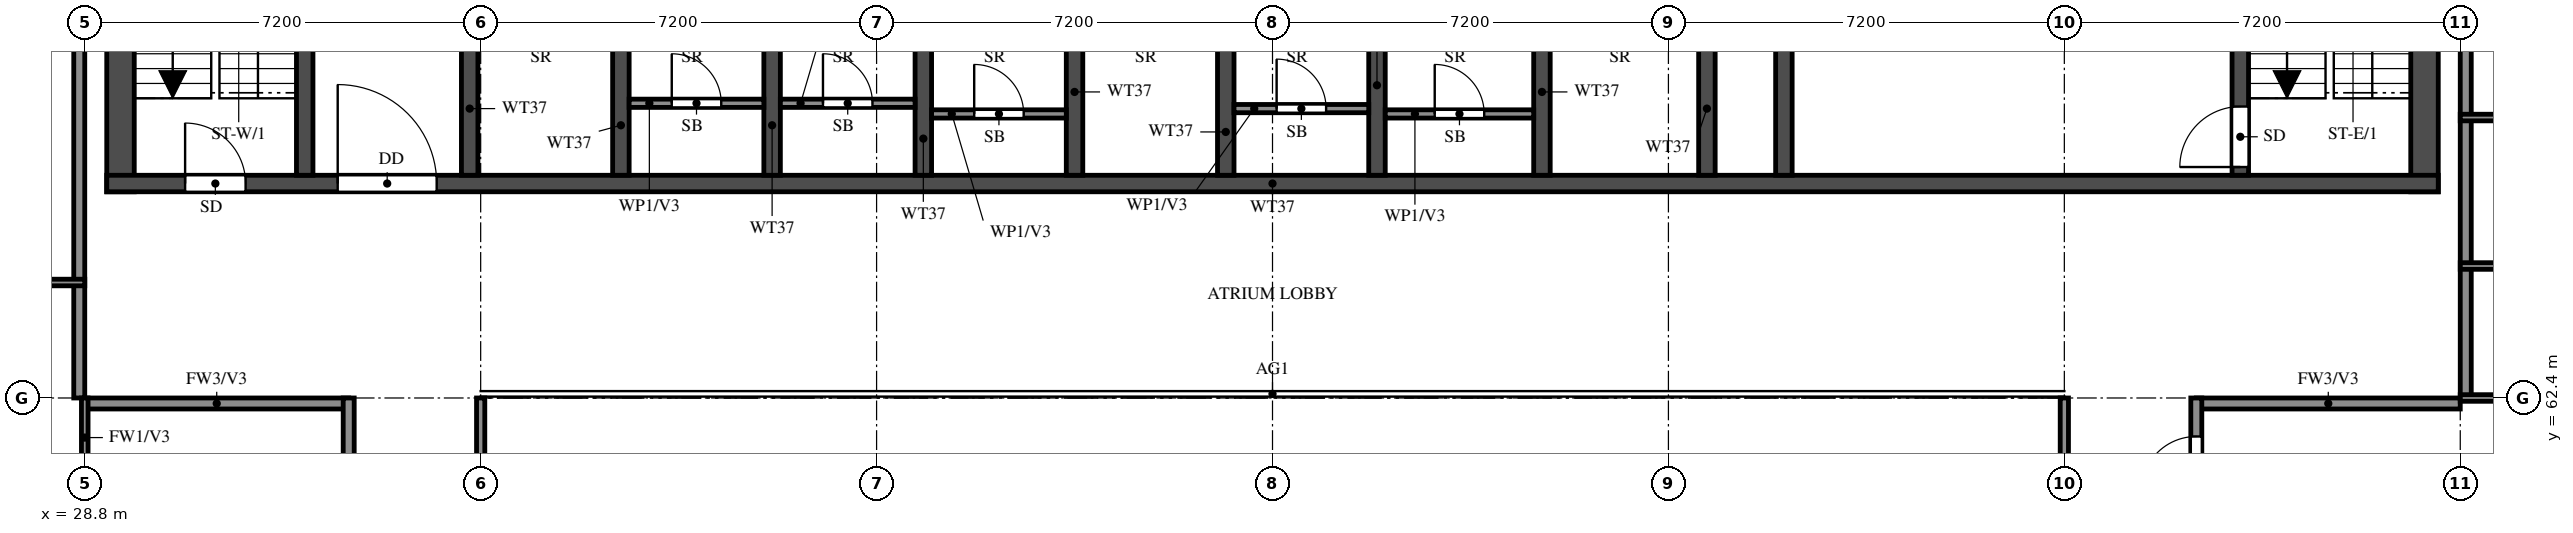
"""IFC4 building model, lengths in metres.
Left out: names, types, materials, properties, quantities, classifications, styles, units other than length and angle.
Written with IfcOpenShell. Run it as: python <this file> out.ifc"""

import sys

from ifc_helpers import new_model, si_unit, direction, frame, frame_2d, origin, place, context, subcontext, project, spatial, rectangle, extrude, element, fill, save


model = new_model("IFC4")
c1 = context("Model", 3, precision=1e-05, world=origin(), true_north=direction((0.0, 1.0)))
c2 = subcontext(c1, "Body", "Model", "MODEL_VIEW")
j1 = project(units=[si_unit("LENGTHUNIT", "METRE"), si_unit("PLANEANGLEUNIT", "RADIAN")], contexts=[c1])
p1 = place(None, origin())
s1 = spatial("IfcSite", under=j1, at=p1, CompositionType="ELEMENT")
p2 = place(p1, origin())
s2 = spatial("IfcBuilding", under=s1, at=p2, CompositionType="ELEMENT")
p3 = place(p2, frame((0.0, 0.0, 257.0)))
s3 = spatial("IfcBuildingStorey", under=s2, at=p3, CompositionType="ELEMENT", Elevation=257.0)
for number, where, z_axis, x_axis in (
    (1, (29.45, 66.15, 0.0), (0.0, 0.0, 1.0), (0.0, 1.0, 0.0)),
    (2, (71.35, 66.15, 0.0), (0.0, 0.0, 1.0), (0.0, 1.0, 0.0)),
):
    element("IfcWall", number, at=place(p3, frame(where, z_axis=z_axis, x_axis=x_axis)), inside=s3, PredefinedType="SHEAR", context=c2, shape_type="SweptSolid", body=[
        extrude(rectangle(XDim=11.85, YDim=0.5, at=frame_2d((5.925, 0.0))), origin(), (0.0, 0.0, 1.0), 3.22),
    ])
p4 = place(p3, frame((29.2, 66.3, 0.0), z_axis=(0.0, 0.0, 1.0), x_axis=(1.0, 0.0, 0.0)))
e3 = element("IfcWall", 3, at=p4, inside=s3, PredefinedType="SHEAR", context=c2, shape_type="SweptSolid", body=[
    extrude(rectangle(XDim=42.4, YDim=0.3, at=frame_2d((21.2, 0.0))), origin(), (0.0, 0.0, 1.0), 3.22),
])
p5 = place(p4, frame((1.425, 0.0, 0.0)))
e4 = element("IfcOpeningElement", 4, at=p5, cuts=e3, PredefinedType="OPENING", context=c2, shape_type="SweptSolid", body=[
    extrude(rectangle(XDim=1.1, YDim=2.1, at=frame_2d((0.55, 1.05))), frame((0.0, 0.16, 0.0), z_axis=(0.0, -1.0, 0.0), x_axis=(1.0, 0.0, 0.0)), (0.0, 0.0, 1.0), 0.32),
])
p6 = place(p4, frame((4.2, 0.0, 0.0)))
e5 = element("IfcOpeningElement", 5, at=p6, cuts=e3, PredefinedType="OPENING", context=c2, shape_type="SweptSolid", body=[
    extrude(rectangle(XDim=1.8, YDim=2.1, at=frame_2d((0.9, 1.05))), frame((0.0, 0.16, 0.0), z_axis=(0.0, -1.0, 0.0), x_axis=(1.0, 0.0, 0.0)), (0.0, 0.0, 1.0), 0.32),
])
p7 = place(p3, frame((32.8, 66.45, 0.0), z_axis=(0.0, 0.0, 1.0), x_axis=(0.0, 1.0, 0.0)))
e6 = element("IfcWall", 6, at=p7, inside=s3, PredefinedType="SHEAR", context=c2, shape_type="SweptSolid", body=[
    extrude(rectangle(XDim=11.05, YDim=0.3, at=frame_2d((5.525, 0.0))), origin(), (0.0, 0.0, 1.0), 3.22),
])
p8 = place(p3, frame((68.0, 66.45, 0.0), z_axis=(0.0, 0.0, 1.0), x_axis=(0.0, 1.0, 0.0)))
e7 = element("IfcWall", 7, at=p8, inside=s3, PredefinedType="SHEAR", context=c2, shape_type="SweptSolid", body=[
    extrude(rectangle(XDim=11.05, YDim=0.3, at=frame_2d((5.525, 0.0))), origin(), (0.0, 0.0, 1.0), 3.22),
])
p9 = place(p8, frame((0.15, 0.0, 0.0)))
e8 = element("IfcOpeningElement", 8, at=p9, cuts=e7, PredefinedType="OPENING", context=c2, shape_type="SweptSolid", body=[
    extrude(rectangle(XDim=1.1, YDim=2.1, at=frame_2d((0.55, 1.05))), frame((0.0, 0.16, 0.0), z_axis=(0.0, -1.0, 0.0), x_axis=(1.0, 0.0, 0.0)), (0.0, 0.0, 1.0), 0.32),
])
p10 = place(p3, frame((59.7, 66.45, 0.0), z_axis=(0.0, 0.0, 1.0), x_axis=(0.0, 1.0, 0.0)))
e9 = element("IfcWall", 9, at=p10, inside=s3, PredefinedType="SHEAR", context=c2, shape_type="SweptSolid", body=[
    extrude(rectangle(XDim=6.175, YDim=0.3, at=frame_2d((3.087, 0.0))), origin(), (0.0, 0.0, 1.0), 3.22),
])
p11 = place(p10, frame((3.85, 0.0, 0.0)))
e10 = element("IfcOpeningElement", 10, at=p11, cuts=e9, PredefinedType="OPENING", context=c2, shape_type="SweptSolid", body=[
    extrude(rectangle(XDim=1.2, YDim=2.1, at=frame_2d((0.6, 1.05))), frame((0.0, 0.16, 0.0), z_axis=(0.0, -1.0, 0.0), x_axis=(1.0, 0.0, 0.0)), (0.0, 0.0, 1.0), 0.32),
])
for number, where, z_axis, x_axis in (
    (11, (35.8, 66.45, 0.0), (0.0, 0.0, 1.0), (0.0, 1.0, 0.0)),
    (12, (38.55, 66.45, 0.0), (0.0, 0.0, 1.0), (0.0, 1.0, 0.0)),
    (13, (41.3, 66.45, 0.0), (0.0, 0.0, 1.0), (0.0, 1.0, 0.0)),
    (14, (44.05, 66.45, 0.0), (0.0, 0.0, 1.0), (0.0, 1.0, 0.0)),
    (15, (46.8, 66.45, 0.0), (0.0, 0.0, 1.0), (0.0, 1.0, 0.0)),
    (16, (49.55, 66.45, 0.0), (0.0, 0.0, 1.0), (0.0, 1.0, 0.0)),
    (17, (52.3, 66.45, 0.0), (0.0, 0.0, 1.0), (0.0, 1.0, 0.0)),
    (18, (55.3, 66.45, 0.0), (0.0, 0.0, 1.0), (0.0, 1.0, 0.0)),
    (19, (58.3, 66.45, 0.0), (0.0, 0.0, 1.0), (0.0, 1.0, 0.0)),
):
    element("IfcWall", number, at=place(p3, frame(where, z_axis=z_axis, x_axis=x_axis)), inside=s3, PredefinedType="SHEAR", context=c2, shape_type="SweptSolid", body=[
        extrude(rectangle(XDim=2.425, YDim=0.3, at=frame_2d((1.212, 0.0))), origin(), (0.0, 0.0, 1.0), 3.22),
    ])
p12 = place(p3, frame((38.7, 67.76, 0.0), z_axis=(0.0, 0.0, 1.0), x_axis=(1.0, 0.0, 0.0)))
e20 = element("IfcWall", 20, at=p12, inside=s3, PredefinedType="PARTITIONING", context=c2, shape_type="SweptSolid", body=[
    extrude(rectangle(XDim=2.45, YDim=0.15, at=frame_2d((1.225, 0.0))), origin(), (0.0, 0.0, 1.0), 3.22),
])
p13 = place(p12, frame((0.775, 0.0, 0.0)))
e21 = element("IfcOpeningElement", 21, at=p13, cuts=e20, PredefinedType="OPENING", context=c2, shape_type="SweptSolid", body=[
    extrude(rectangle(XDim=0.9, YDim=2.1, at=frame_2d((0.45, 1.05))), frame((0.0, 0.085, 0.0), z_axis=(0.0, -1.0, 0.0), x_axis=(1.0, 0.0, 0.0)), (0.0, 0.0, 1.0), 0.17),
])
p14 = place(p3, frame((41.45, 67.76, 0.0), z_axis=(0.0, 0.0, 1.0), x_axis=(1.0, 0.0, 0.0)))
e22 = element("IfcWall", 22, at=p14, inside=s3, PredefinedType="PARTITIONING", context=c2, shape_type="SweptSolid", body=[
    extrude(rectangle(XDim=2.45, YDim=0.15, at=frame_2d((1.225, 0.0))), origin(), (0.0, 0.0, 1.0), 3.22),
])
p15 = place(p14, frame((0.775, 0.0, 0.0)))
e23 = element("IfcOpeningElement", 23, at=p15, cuts=e22, PredefinedType="OPENING", context=c2, shape_type="SweptSolid", body=[
    extrude(rectangle(XDim=0.9, YDim=2.1, at=frame_2d((0.45, 1.05))), frame((0.0, 0.085, 0.0), z_axis=(0.0, -1.0, 0.0), x_axis=(1.0, 0.0, 0.0)), (0.0, 0.0, 1.0), 0.17),
])
p16 = place(p3, frame((44.2, 67.565, 0.0), z_axis=(0.0, 0.0, 1.0), x_axis=(1.0, 0.0, 0.0)))
e24 = element("IfcWall", 24, at=p16, inside=s3, PredefinedType="PARTITIONING", context=c2, shape_type="SweptSolid", body=[
    extrude(rectangle(XDim=2.45, YDim=0.15, at=frame_2d((1.225, 0.0))), origin(), (0.0, 0.0, 1.0), 3.22),
])
p17 = place(p16, frame((0.775, 0.0, 0.0)))
e25 = element("IfcOpeningElement", 25, at=p17, cuts=e24, PredefinedType="OPENING", context=c2, shape_type="SweptSolid", body=[
    extrude(rectangle(XDim=0.9, YDim=2.1, at=frame_2d((0.45, 1.05))), frame((0.0, 0.085, 0.0), z_axis=(0.0, -1.0, 0.0), x_axis=(1.0, 0.0, 0.0)), (0.0, 0.0, 1.0), 0.17),
])
p18 = place(p3, frame((49.7, 67.663, 0.0), z_axis=(0.0, 0.0, 1.0), x_axis=(1.0, 0.0, 0.0)))
e26 = element("IfcWall", 26, at=p18, inside=s3, PredefinedType="PARTITIONING", context=c2, shape_type="SweptSolid", body=[
    extrude(rectangle(XDim=2.45, YDim=0.15, at=frame_2d((1.225, 0.0))), origin(), (0.0, 0.0, 1.0), 3.22),
])
p19 = place(p18, frame((0.775, 0.0, 0.0)))
e27 = element("IfcOpeningElement", 27, at=p19, cuts=e26, PredefinedType="OPENING", context=c2, shape_type="SweptSolid", body=[
    extrude(rectangle(XDim=0.9, YDim=2.1, at=frame_2d((0.45, 1.05))), frame((0.0, 0.085, 0.0), z_axis=(0.0, -1.0, 0.0), x_axis=(1.0, 0.0, 0.0)), (0.0, 0.0, 1.0), 0.17),
])
p20 = place(p3, frame((52.45, 67.565, 0.0), z_axis=(0.0, 0.0, 1.0), x_axis=(1.0, 0.0, 0.0)))
e28 = element("IfcWall", 28, at=p20, inside=s3, PredefinedType="PARTITIONING", context=c2, shape_type="SweptSolid", body=[
    extrude(rectangle(XDim=2.7, YDim=0.15, at=frame_2d((1.35, 0.0))), origin(), (0.0, 0.0, 1.0), 3.22),
])
p21 = place(p20, frame((0.9, 0.0, 0.0)))
e29 = element("IfcOpeningElement", 29, at=p21, cuts=e28, PredefinedType="OPENING", context=c2, shape_type="SweptSolid", body=[
    extrude(rectangle(XDim=0.9, YDim=2.1, at=frame_2d((0.45, 1.05))), frame((0.0, 0.085, 0.0), z_axis=(0.0, -1.0, 0.0), x_axis=(1.0, 0.0, 0.0)), (0.0, 0.0, 1.0), 0.17),
])
for number, where, z_axis, x_axis in (
    (30, (28.8, 62.3, 0.0), (0.0, 0.0, 1.0), (1.0, 0.0, 0.0)),
    (31, (67.2, 62.3, 0.0), (0.0, 0.0, 1.0), (1.0, 0.0, 0.0)),
):
    element("IfcWall", number, at=place(p3, frame(where, z_axis=z_axis, x_axis=x_axis)), inside=s3, PredefinedType="SOLIDWALL", context=c2, shape_type="SweptSolid", body=[
        extrude(rectangle(XDim=4.8, YDim=0.2, at=frame_2d((2.4, 0.0))), origin(), (0.0, 0.0, 1.0), 3.22),
    ])
p22 = place(p3, frame((28.7, 62.4, 0.0), z_axis=(0.0, 0.0, 1.0), x_axis=(0.0, 1.0, 0.0)))
e32 = element("IfcWall", 32, at=p22, inside=s3, PredefinedType="SOLIDWALL", context=c2, shape_type="SweptSolid", body=[
    extrude(rectangle(XDim=15.6, YDim=0.2, at=frame_2d((7.8, 0.0))), origin(), (0.0, 0.0, 1.0), 3.22),
])
p23 = place(p3, frame((33.6, 56.4, 0.0), z_axis=(0.0, 0.0, 1.0), x_axis=(0.0, 1.0, 0.0)))
e33 = element("IfcWall", 33, at=p23, inside=s3, PredefinedType="SOLIDWALL", context=c2, shape_type="SweptSolid", body=[
    extrude(rectangle(XDim=6.0, YDim=0.2, at=frame_2d((3.0, 0.0))), origin(), (0.0, 0.0, 1.0), 3.22),
])
p24 = place(p23, frame((3.7, 0.0, 0.0)))
e34 = element("IfcOpeningElement", 34, at=p24, cuts=e33, PredefinedType="OPENING", context=c2, shape_type="SweptSolid", body=[
    extrude(rectangle(XDim=1.0, YDim=2.1, at=frame_2d((0.5, 1.05))), frame((0.0, 0.11, 0.0), z_axis=(0.0, -1.0, 0.0), x_axis=(1.0, 0.0, 0.0)), (0.0, 0.0, 1.0), 0.22),
])
p25 = place(p3, frame((67.2, 60.0, 0.0), z_axis=(0.0, 0.0, 1.0), x_axis=(0.0, 1.0, 0.0)))
e35 = element("IfcWall", 35, at=p25, inside=s3, PredefinedType="SOLIDWALL", context=c2, shape_type="SweptSolid", body=[
    extrude(rectangle(XDim=2.4, YDim=0.2, at=frame_2d((1.2, 0.0))), origin(), (0.0, 0.0, 1.0), 3.22),
])
p26 = place(p25, frame((0.7, 0.0, 0.0)))
e36 = element("IfcOpeningElement", 36, at=p26, cuts=e35, PredefinedType="OPENING", context=c2, shape_type="SweptSolid", body=[
    extrude(rectangle(XDim=1.0, YDim=2.1, at=frame_2d((0.5, 1.05))), frame((0.0, 0.11, 0.0), z_axis=(0.0, -1.0, 0.0), x_axis=(1.0, 0.0, 0.0)), (0.0, 0.0, 1.0), 0.22),
])
p27 = place(p3, frame((72.1, 62.4, 0.0), z_axis=(0.0, 0.0, 1.0), x_axis=(0.0, 1.0, 0.0)))
e37 = element("IfcWall", 37, at=p27, inside=s3, PredefinedType="SOLIDWALL", context=c2, shape_type="SweptSolid", body=[
    extrude(rectangle(XDim=15.6, YDim=0.2, at=frame_2d((7.8, 0.0))), origin(), (0.0, 0.0, 1.0), 3.22),
])
p28 = place(p3, frame((72.0, 62.4, 0.0), z_axis=(0.0, 0.0, 1.0), x_axis=(1.0, 0.0, 0.0)))
e38 = element("IfcWall", 38, at=p28, inside=s3, PredefinedType="PARTITIONING", context=c2, shape_type="SweptSolid", body=[
    extrude(rectangle(XDim=2.4, YDim=0.12, at=frame_2d((1.2, 0.0))), origin(), (0.0, 0.0, 1.0), 3.22),
])
p29 = place(p28, frame((0.75, 0.0, 0.0)))
e39 = element("IfcOpeningElement", 39, at=p29, cuts=e38, PredefinedType="OPENING", context=c2, shape_type="SweptSolid", body=[
    extrude(rectangle(XDim=0.9, YDim=2.1, at=frame_2d((0.45, 1.05))), frame((0.0, 0.07, 0.0), z_axis=(0.0, -1.0, 0.0), x_axis=(1.0, 0.0, 0.0)), (0.0, 0.0, 1.0), 0.14),
])
p30 = place(p3, frame((25.3, 64.5, 0.0), z_axis=(0.0, 0.0, 1.0), x_axis=(1.0, 0.0, 0.0)))
e40 = element("IfcWall", 40, at=p30, inside=s3, PredefinedType="PARTITIONING", context=c2, shape_type="SweptSolid", body=[
    extrude(rectangle(XDim=3.5, YDim=0.12, at=frame_2d((1.75, 0.0))), origin(), (0.0, 0.0, 1.0), 3.22),
])
p31 = place(p3, frame((72.0, 64.8, 0.0), z_axis=(0.0, 0.0, 1.0), x_axis=(1.0, 0.0, 0.0)))
e41 = element("IfcWall", 41, at=p31, inside=s3, PredefinedType="PARTITIONING", context=c2, shape_type="SweptSolid", body=[
    extrude(rectangle(XDim=3.5, YDim=0.12, at=frame_2d((1.75, 0.0))), origin(), (0.0, 0.0, 1.0), 3.22),
])
p32 = place(p31, frame((1.3, 0.0, 0.0)))
e42 = element("IfcOpeningElement", 42, at=p32, cuts=e41, PredefinedType="OPENING", context=c2, shape_type="SweptSolid", body=[
    extrude(rectangle(XDim=0.9, YDim=2.1, at=frame_2d((0.45, 1.05))), frame((0.0, 0.07, 0.0), z_axis=(0.0, -1.0, 0.0), x_axis=(1.0, 0.0, 0.0)), (0.0, 0.0, 1.0), 0.14),
])
p33 = place(p3, frame((72.0, 67.5, 0.0), z_axis=(0.0, 0.0, 1.0), x_axis=(1.0, 0.0, 0.0)))
e43 = element("IfcWall", 43, at=p33, inside=s3, PredefinedType="PARTITIONING", context=c2, shape_type="SweptSolid", body=[
    extrude(rectangle(XDim=3.5, YDim=0.12, at=frame_2d((1.75, 0.0))), origin(), (0.0, 0.0, 1.0), 3.22),
])
p34 = place(p3, frame((28.8, 58.8, 0.0), z_axis=(0.0, 0.0, 1.0), x_axis=(0.0, 1.0, 0.0)))
e44 = element("IfcWall", 44, at=p34, inside=s3, PredefinedType="PARTITIONING", context=c2, shape_type="SweptSolid", body=[
    extrude(rectangle(XDim=3.6, YDim=0.12, at=frame_2d((1.8, 0.0))), origin(), (0.0, 0.0, 1.0), 3.22),
])
p35 = place(p34, frame((0.75, 0.0, 0.0)))
e45 = element("IfcOpeningElement", 45, at=p35, cuts=e44, PredefinedType="OPENING", context=c2, shape_type="SweptSolid", body=[
    extrude(rectangle(XDim=0.9, YDim=2.1, at=frame_2d((0.45, 1.05))), frame((0.0, 0.07, 0.0), z_axis=(0.0, -1.0, 0.0), x_axis=(1.0, 0.0, 0.0)), (0.0, 0.0, 1.0), 0.14),
])
for number, where, z_axis, x_axis in (
    (46, (36.0, 48.0, 0.0), (0.0, 0.0, 1.0), (0.0, 1.0, 0.0)),
    (47, (64.8, 48.0, 0.0), (0.0, 0.0, 1.0), (0.0, 1.0, 0.0)),
):
    element("IfcWall", number, at=place(p3, frame(where, z_axis=z_axis, x_axis=x_axis)), inside=s3, PredefinedType="SOLIDWALL", context=c2, shape_type="SweptSolid", body=[
        extrude(rectangle(XDim=14.4, YDim=0.15, at=frame_2d((7.2, 0.0))), origin(), (0.0, 0.0, 1.0), 2.32),
    ])
p36 = place(p5, origin())
e48 = element("IfcDoor", 48, at=p36, inside=s3, OperationType="SINGLE_SWING_LEFT", PredefinedType="DOOR", context=c2, shape_type="SweptSolid", body=[
    extrude(rectangle(XDim=1.1, YDim=2.1, at=frame_2d((0.55, 1.05))), frame((0.0, 0.025, 0.0), z_axis=(0.0, -1.0, 0.0), x_axis=(1.0, 0.0, 0.0)), (0.0, 0.0, 1.0), 0.05),
])
fill(e4, e48)
p37 = place(p9, origin())
e49 = element("IfcDoor", 49, at=p37, inside=s3, OperationType="SINGLE_SWING_RIGHT", PredefinedType="DOOR", context=c2, shape_type="SweptSolid", body=[
    extrude(rectangle(XDim=1.1, YDim=2.1, at=frame_2d((0.55, 1.05))), frame((0.0, 0.025, 0.0), z_axis=(0.0, -1.0, 0.0), x_axis=(1.0, 0.0, 0.0)), (0.0, 0.0, 1.0), 0.05),
])
fill(e8, e49)
p38 = place(p6, origin())
e50 = element("IfcDoor", 50, at=p38, inside=s3, OperationType="DOUBLE_DOOR_SINGLE_SWING", PredefinedType="DOOR", context=c2, shape_type="SweptSolid", body=[
    extrude(rectangle(XDim=1.8, YDim=2.1, at=frame_2d((0.9, 1.05))), frame((0.0, 0.025, 0.0), z_axis=(0.0, -1.0, 0.0), x_axis=(1.0, 0.0, 0.0)), (0.0, 0.0, 1.0), 0.05),
])
fill(e5, e50)
p39 = place(p13, origin())
e51 = element("IfcDoor", 51, at=p39, inside=s3, OperationType="SINGLE_SWING_RIGHT", PredefinedType="DOOR", context=c2, shape_type="SweptSolid", body=[
    extrude(rectangle(XDim=0.9, YDim=2.1, at=frame_2d((0.45, 1.05))), frame((0.0, 0.025, 0.0), z_axis=(0.0, -1.0, 0.0), x_axis=(1.0, 0.0, 0.0)), (0.0, 0.0, 1.0), 0.05),
])
fill(e21, e51)
p40 = place(p15, origin())
e52 = element("IfcDoor", 52, at=p40, inside=s3, OperationType="SINGLE_SWING_LEFT", PredefinedType="DOOR", context=c2, shape_type="SweptSolid", body=[
    extrude(rectangle(XDim=0.9, YDim=2.1, at=frame_2d((0.45, 1.05))), frame((0.0, 0.025, 0.0), z_axis=(0.0, -1.0, 0.0), x_axis=(1.0, 0.0, 0.0)), (0.0, 0.0, 1.0), 0.05),
])
fill(e23, e52)
p41 = place(p17, origin())
e53 = element("IfcDoor", 53, at=p41, inside=s3, OperationType="SINGLE_SWING_LEFT", PredefinedType="DOOR", context=c2, shape_type="SweptSolid", body=[
    extrude(rectangle(XDim=0.9, YDim=2.1, at=frame_2d((0.45, 1.05))), frame((0.0, 0.025, 0.0), z_axis=(0.0, -1.0, 0.0), x_axis=(1.0, 0.0, 0.0)), (0.0, 0.0, 1.0), 0.05),
])
fill(e25, e53)
p42 = place(p19, origin())
e54 = element("IfcDoor", 54, at=p42, inside=s3, OperationType="SINGLE_SWING_LEFT", PredefinedType="DOOR", context=c2, shape_type="SweptSolid", body=[
    extrude(rectangle(XDim=0.9, YDim=2.1, at=frame_2d((0.45, 1.05))), frame((0.0, 0.025, 0.0), z_axis=(0.0, -1.0, 0.0), x_axis=(1.0, 0.0, 0.0)), (0.0, 0.0, 1.0), 0.05),
])
fill(e27, e54)
p43 = place(p21, origin())
e55 = element("IfcDoor", 55, at=p43, inside=s3, OperationType="SINGLE_SWING_RIGHT", PredefinedType="DOOR", context=c2, shape_type="SweptSolid", body=[
    extrude(rectangle(XDim=0.9, YDim=2.1, at=frame_2d((0.45, 1.05))), frame((0.0, 0.025, 0.0), z_axis=(0.0, -1.0, 0.0), x_axis=(1.0, 0.0, 0.0)), (0.0, 0.0, 1.0), 0.05),
])
fill(e29, e55)
p44 = place(p26, origin())
e56 = element("IfcDoor", 56, at=p44, inside=s3, OperationType="SINGLE_SWING_LEFT", PredefinedType="DOOR", context=c2, shape_type="SweptSolid", body=[
    extrude(rectangle(XDim=1.0, YDim=2.1, at=frame_2d((0.5, 1.05))), frame((0.0, 0.025, 0.0), z_axis=(0.0, -1.0, 0.0), x_axis=(1.0, 0.0, 0.0)), (0.0, 0.0, 1.0), 0.05),
])
fill(e36, e56)
save(model, sys.argv[1])
